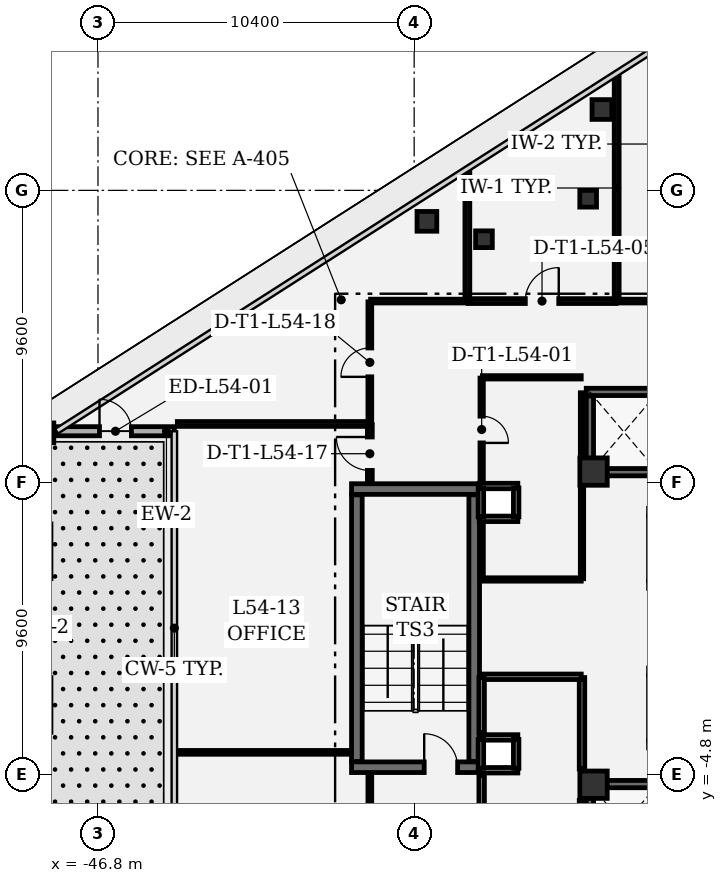
"""IFC4 building model, lengths in metres.
Left out: names, types, materials, properties, quantities, classifications, styles, units other than length and angle.
Written with IfcOpenShell. Run it as: python <this file> out.ifc"""

import sys

from ifc_helpers import new_model, si_unit, direction, frame, frame_2d, origin, origin_2d, place, context, subcontext, project, spatial, rectangle, extrude, element, fill, save


model = new_model("IFC4")
c1 = context("Model", 3, precision=1e-05, world=origin(), true_north=direction((0.0, 1.0)))
c2 = subcontext(c1, "Body", "Model", "MODEL_VIEW")
j1 = project(units=[si_unit("LENGTHUNIT", "METRE"), si_unit("PLANEANGLEUNIT", "RADIAN")], contexts=[c1])
p1 = place(None, origin())
s1 = spatial("IfcSite", under=j1, at=p1, CompositionType="ELEMENT")
p2 = place(p1, origin())
s2 = spatial("IfcBuilding", under=s1, at=p2, CompositionType="ELEMENT")
p3 = place(p2, frame((0.0, 0.0, 233.4)))
s3 = spatial("IfcBuildingStorey", under=s2, at=p3, CompositionType="ELEMENT", Elevation=233.4)
for number, where, z_axis, x_axis in (
    (1, (-30.5, 5.15, 0.0), (0.0, 0.0, 1.0), (1.0, 0.0, 0.0)),
    (2, (-30.5, -5.15, 0.0), (0.0, 0.0, 1.0), (1.0, 0.0, 0.0)),
):
    element("IfcColumn", number, at=place(p3, frame(where, z_axis=z_axis, x_axis=x_axis)), inside=s3, PredefinedType="COLUMN", context=c2, shape_type="SweptSolid", body=[
        extrude(rectangle(XDim=0.9, YDim=0.9, at=origin_2d()), origin(), (0.0, 0.0, 1.0), 4.05),
    ])
for number, where, z_axis, x_axis in (
    (3, (-48.578, 6.425, 0.0), (0.0, 0.0, 1.0), (1.0, 0.0, 0.0)),
    (4, (-35.981, 13.381, 0.0), (0.0, 0.0, 1.0), (1.0, 0.0, 0.0)),
    (5, (-30.225, 17.06, 0.0), (0.0, 0.0, 1.0), (1.0, 0.0, 0.0)),
):
    element("IfcColumn", number, at=place(p3, frame(where, z_axis=z_axis, x_axis=x_axis)), inside=s3, PredefinedType="COLUMN", context=c2, shape_type="SweptSolid", body=[
        extrude(rectangle(XDim=0.65, YDim=0.65, at=origin_2d()), origin(), (0.0, 0.0, 1.0), 4.05),
    ])
for number, where, z_axis, x_axis in (
    (6, (-34.104, 12.792, 0.0), (0.0, 0.0, 1.0), (1.0, 0.0, 0.0)),
    (7, (-30.677, 14.124, 0.0), (0.0, 0.0, 1.0), (1.0, 0.0, 0.0)),
):
    element("IfcColumn", number, at=place(p3, frame(where, z_axis=z_axis, x_axis=x_axis)), inside=s3, PredefinedType="COLUMN", context=c2, shape_type="SweptSolid", body=[
        extrude(rectangle(XDim=0.55, YDim=0.55, at=origin_2d()), origin(), (0.0, 0.0, 1.0), 4.05),
    ])
p4 = place(p3, frame((-48.162, 6.477, 0.0), z_axis=(0.0, 0.0, 1.0), x_axis=(1.0, 0.0, 0.0)))
e8 = element("IfcWall", 8, at=p4, inside=s3, PredefinedType="SOLIDWALL", context=c2, shape_type="SweptSolid", body=[
    extrude(rectangle(XDim=3.874, YDim=0.3, at=frame_2d((1.937, 0.0))), origin(), (0.0, 0.0, 1.0), 3.78),
])
p5 = place(p4, frame((1.412, 0.0, 0.0)))
e9 = element("IfcOpeningElement", 9, at=p5, cuts=e8, PredefinedType="OPENING", context=c2, shape_type="SweptSolid", body=[
    extrude(rectangle(XDim=1.05, YDim=2.2, at=frame_2d((0.525, 1.1))), frame((0.0, 0.16, 0.0), z_axis=(0.0, -1.0, 0.0), x_axis=(1.0, 0.0, 0.0)), (0.0, 0.0, 1.0), 0.32),
])
p6 = place(p3, frame((-38.46, -4.575, 0.0), z_axis=(0.0, 0.0, 1.0), x_axis=(1.0, 0.0, 0.0)))
e10 = element("IfcWall", 10, at=p6, inside=s3, PredefinedType="SHEAR", context=c2, shape_type="SweptSolid", body=[
    extrude(rectangle(XDim=4.21, YDim=0.35, at=frame_2d((2.105, 0.0))), origin(), (0.0, 0.0, 1.0), 3.78),
])
p7 = place(p6, frame((2.39, 0.0, 0.0)))
e11 = element("IfcOpeningElement", 11, at=p7, cuts=e10, PredefinedType="OPENING", context=c2, shape_type="SweptSolid", body=[
    extrude(rectangle(XDim=1.1, YDim=2.2, at=frame_2d((0.55, 1.1))), frame((0.0, 0.185, 0.0), z_axis=(0.0, -1.0, 0.0), x_axis=(1.0, 0.0, 0.0)), (0.0, 0.0, 1.0), 0.37),
])
p8 = place(p3, frame((-34.25, 4.575, 0.0), z_axis=(0.0, 0.0, 1.0), x_axis=(-1.0, 0.0, 0.0)))
e12 = element("IfcWall", 12, at=p8, inside=s3, PredefinedType="SHEAR", context=c2, shape_type="SweptSolid", body=[
    extrude(rectangle(XDim=4.21, YDim=0.35, at=frame_2d((2.105, 0.0))), origin(), (0.0, 0.0, 1.0), 3.78),
])
for number, where, z_axis, x_axis in (
    (13, (-34.425, -4.385, 0.0), (0.0, 0.0, 1.0), (0.0, 1.0, 0.0)),
    (14, (-38.285, 4.385, 0.0), (0.0, 0.0, 1.0), (0.0, -1.0, 0.0)),
):
    element("IfcWall", number, at=place(p3, frame(where, z_axis=z_axis, x_axis=x_axis)), inside=s3, PredefinedType="SHEAR", context=c2, shape_type="SweptSolid", body=[
        extrude(rectangle(XDim=8.77, YDim=0.35, at=frame_2d((4.385, 0.0))), origin(), (0.0, 0.0, 1.0), 3.78),
    ])
for number, where, z_axis, x_axis in (
    (15, (-28.26, 5.13, 0.0), (0.0, 0.0, 1.0), (-1.0, 0.0, 0.0)),
    (16, (-30.74, 7.77, 0.0), (0.0, 0.0, 1.0), (1.0, 0.0, 0.0)),
):
    element("IfcWall", number, at=place(p3, frame(where, z_axis=z_axis, x_axis=x_axis)), inside=s3, PredefinedType="SHEAR", context=c2, shape_type="SweptSolid", body=[
        extrude(rectangle(XDim=2.48, YDim=0.24, at=frame_2d((1.24, 0.0))), origin(), (0.0, 0.0, 1.0), 3.78),
    ])
p9 = place(p3, frame((-30.62, 5.262, 0.0), z_axis=(0.0, 0.0, 1.0), x_axis=(0.0, 1.0, 0.0)))
e17 = element("IfcWall", 17, at=p9, inside=s3, PredefinedType="SHEAR", context=c2, shape_type="SweptSolid", body=[
    extrude(rectangle(XDim=2.376, YDim=0.24, at=frame_2d((1.188, 0.0))), origin(), (0.0, 0.0, 1.0), 3.78),
])
p10 = place(p3, frame((-30.74, -5.13, 0.0), z_axis=(0.0, 0.0, 1.0), x_axis=(1.0, 0.0, 0.0)))
e18 = element("IfcWall", 18, at=p10, inside=s3, PredefinedType="SHEAR", context=c2, shape_type="SweptSolid", body=[
    extrude(rectangle(XDim=2.48, YDim=0.24, at=frame_2d((1.24, 0.0))), origin(), (0.0, 0.0, 1.0), 3.78),
])
p11 = place(p3, frame((-30.62, -7.638, 0.0), z_axis=(0.0, 0.0, 1.0), x_axis=(0.0, 1.0, 0.0)))
e19 = element("IfcWall", 19, at=p11, inside=s3, PredefinedType="SHEAR", context=c2, shape_type="SweptSolid", body=[
    extrude(rectangle(XDim=2.376, YDim=0.24, at=frame_2d((1.188, 0.0))), origin(), (0.0, 0.0, 1.0), 3.78),
])
for number, where, z_axis, x_axis in (
    (20, (-32.99, 3.595, 0.0), (0.0, 0.0, 1.0), (-1.0, 0.0, 0.0)),
    (21, (-34.26, 4.675, 0.0), (0.0, 0.0, 1.0), (1.0, 0.0, 0.0)),
):
    element("IfcWall", number, at=place(p3, frame(where, z_axis=z_axis, x_axis=x_axis)), inside=s3, PredefinedType="PARTITIONING", context=c2, shape_type="SweptSolid", body=[
        extrude(rectangle(XDim=1.27, YDim=0.18, at=frame_2d((0.635, 0.0))), origin(), (0.0, 0.0, 1.0), 3.78),
    ])
for number, where, z_axis, x_axis in (
    (22, (-34.205, 3.66, 0.0), (0.0, 0.0, 1.0), (0.0, 1.0, 0.0)),
    (23, (-33.045, 4.61, 0.0), (0.0, 0.0, 1.0), (0.0, -1.0, 0.0)),
):
    element("IfcWall", number, at=place(p3, frame(where, z_axis=z_axis, x_axis=x_axis)), inside=s3, PredefinedType="PARTITIONING", context=c2, shape_type="SweptSolid", body=[
        extrude(rectangle(XDim=0.95, YDim=0.18, at=frame_2d((0.475, 0.0))), origin(), (0.0, 0.0, 1.0), 3.78),
    ])
for number, where, z_axis, x_axis in (
    (24, (-32.99, -4.675, 0.0), (0.0, 0.0, 1.0), (-1.0, 0.0, 0.0)),
    (25, (-34.26, -3.595, 0.0), (0.0, 0.0, 1.0), (1.0, 0.0, 0.0)),
):
    element("IfcWall", number, at=place(p3, frame(where, z_axis=z_axis, x_axis=x_axis)), inside=s3, PredefinedType="PARTITIONING", context=c2, shape_type="SweptSolid", body=[
        extrude(rectangle(XDim=1.27, YDim=0.18, at=frame_2d((0.635, 0.0))), origin(), (0.0, 0.0, 1.0), 3.78),
    ])
for number, where, z_axis, x_axis in (
    (26, (-34.205, -4.61, 0.0), (0.0, 0.0, 1.0), (0.0, 1.0, 0.0)),
    (27, (-33.045, -3.66, 0.0), (0.0, 0.0, 1.0), (0.0, -1.0, 0.0)),
):
    element("IfcWall", number, at=place(p3, frame(where, z_axis=z_axis, x_axis=x_axis)), inside=s3, PredefinedType="PARTITIONING", context=c2, shape_type="SweptSolid", body=[
        extrude(rectangle(XDim=0.95, YDim=0.18, at=frame_2d((0.475, 0.0))), origin(), (0.0, 0.0, 1.0), 3.78),
    ])
p12 = place(p3, frame((-34.155, 1.6, 0.0), z_axis=(0.0, 0.0, 1.0), x_axis=(1.0, 0.0, 0.0)))
e28 = element("IfcWall", 28, at=p12, inside=s3, PredefinedType="PARTITIONING", context=c2, shape_type="SweptSolid", body=[
    extrude(rectangle(XDim=3.25, YDim=0.11, at=frame_2d((1.625, 0.0))), origin(), (0.0, 0.0, 1.0), 3.78),
])
p13 = place(p3, frame((-30.88, 1.625, 0.0), z_axis=(0.0, 0.0, 1.0), x_axis=(0.0, 1.0, 0.0)))
e29 = element("IfcWall", 29, at=p13, inside=s3, PredefinedType="PARTITIONING", context=c2, shape_type="SweptSolid", body=[
    extrude(rectangle(XDim=3.01, YDim=0.11, at=frame_2d((1.505, 0.0))), origin(), (0.0, 0.0, 1.0), 3.78),
])
p14 = place(p3, frame((-30.88, 5.665, 0.0), z_axis=(0.0, 0.0, 1.0), x_axis=(0.0, 1.0, 0.0)))
e30 = element("IfcWall", 30, at=p14, inside=s3, PredefinedType="PARTITIONING", context=c2, shape_type="SweptSolid", body=[
    extrude(rectangle(XDim=2.078, YDim=0.11, at=frame_2d((1.039, 0.0))), origin(), (0.0, 0.0, 1.0), 3.78),
])
p15 = place(p3, frame((-30.905, 8.25, 0.0), z_axis=(0.0, 0.0, 1.0), x_axis=(-1.0, 0.0, 0.0)))
e31 = element("IfcWall", 31, at=p15, inside=s3, PredefinedType="PARTITIONING", context=c2, shape_type="SweptSolid", body=[
    extrude(rectangle(XDim=3.25, YDim=0.11, at=frame_2d((1.625, 0.0))), origin(), (0.0, 0.0, 1.0), 3.78),
])
p16 = place(p3, frame((-34.18, 8.225, 0.0), z_axis=(0.0, 0.0, 1.0), x_axis=(0.0, -1.0, 0.0)))
e32 = element("IfcWall", 32, at=p16, inside=s3, PredefinedType="PARTITIONING", context=c2, shape_type="SweptSolid", body=[
    extrude(rectangle(XDim=3.385, YDim=0.11, at=frame_2d((1.692, 0.0))), origin(), (0.0, 0.0, 1.0), 3.78),
])
p17 = place(p16, frame((1.252, 0.0, 0.0)))
e33 = element("IfcOpeningElement", 33, at=p17, cuts=e32, PredefinedType="OPENING", context=c2, shape_type="SweptSolid", body=[
    extrude(rectangle(XDim=0.88, YDim=2.1, at=frame_2d((0.44, 1.05))), frame((0.0, 0.065, 0.0), z_axis=(0.0, -1.0, 0.0), x_axis=(1.0, 0.0, 0.0)), (0.0, 0.0, 1.0), 0.13),
])
p18 = place(p3, frame((-34.18, 3.43, 0.0), z_axis=(0.0, 0.0, 1.0), x_axis=(0.0, -1.0, 0.0)))
e34 = element("IfcWall", 34, at=p18, inside=s3, PredefinedType="PARTITIONING", context=c2, shape_type="SweptSolid", body=[
    extrude(rectangle(XDim=1.805, YDim=0.11, at=frame_2d((0.902, 0.0))), origin(), (0.0, 0.0, 1.0), 3.78),
])
p19 = place(p3, frame((-30.88, -7.743, 0.0), z_axis=(0.0, 0.0, 1.0), x_axis=(0.0, 1.0, 0.0)))
e35 = element("IfcWall", 35, at=p19, inside=s3, PredefinedType="PARTITIONING", context=c2, shape_type="SweptSolid", body=[
    extrude(rectangle(XDim=2.078, YDim=0.18, at=frame_2d((1.039, 0.0))), origin(), (0.0, 0.0, 1.0), 3.78),
])
p20 = place(p3, frame((-30.88, -4.635, 0.0), z_axis=(0.0, 0.0, 1.0), x_axis=(0.0, 1.0, 0.0)))
e36 = element("IfcWall", 36, at=p20, inside=s3, PredefinedType="PARTITIONING", context=c2, shape_type="SweptSolid", body=[
    extrude(rectangle(XDim=3.01, YDim=0.18, at=frame_2d((1.505, 0.0))), origin(), (0.0, 0.0, 1.0), 3.78),
])
p21 = place(p3, frame((-30.905, -1.6, 0.0), z_axis=(0.0, 0.0, 1.0), x_axis=(-1.0, 0.0, 0.0)))
e37 = element("IfcWall", 37, at=p21, inside=s3, PredefinedType="PARTITIONING", context=c2, shape_type="SweptSolid", body=[
    extrude(rectangle(XDim=3.25, YDim=0.18, at=frame_2d((1.625, 0.0))), origin(), (0.0, 0.0, 1.0), 3.78),
])
p22 = place(p3, frame((-34.18, -1.625, 0.0), z_axis=(0.0, 0.0, 1.0), x_axis=(0.0, -1.0, 0.0)))
e38 = element("IfcWall", 38, at=p22, inside=s3, PredefinedType="PARTITIONING", context=c2, shape_type="SweptSolid", body=[
    extrude(rectangle(XDim=1.805, YDim=0.18, at=frame_2d((0.902, 0.0))), origin(), (0.0, 0.0, 1.0), 3.78),
])
p23 = place(p3, frame((-34.18, -4.84, 0.0), z_axis=(0.0, 0.0, 1.0), x_axis=(0.0, -1.0, 0.0)))
e39 = element("IfcWall", 39, at=p23, inside=s3, PredefinedType="PARTITIONING", context=c2, shape_type="SweptSolid", body=[
    extrude(rectangle(XDim=3.485, YDim=0.18, at=frame_2d((1.743, 0.0))), origin(), (0.0, 0.0, 1.0), 3.78),
])
p24 = place(p23, frame((1.302, 0.0, 0.0)))
e40 = element("IfcOpeningElement", 40, at=p24, cuts=e39, PredefinedType="OPENING", context=c2, shape_type="SweptSolid", body=[
    extrude(rectangle(XDim=0.88, YDim=2.1, at=frame_2d((0.44, 1.05))), frame((0.0, 0.1, 0.0), z_axis=(0.0, -1.0, 0.0), x_axis=(1.0, 0.0, 0.0)), (0.0, 0.0, 1.0), 0.2),
])
p25 = place(p3, frame((-34.625, 10.758, 0.0), z_axis=(0.0, 0.0, 1.0), x_axis=(1.0, 0.0, 0.0)))
e41 = element("IfcWall", 41, at=p25, inside=s3, PredefinedType="PARTITIONING", context=c2, shape_type="SweptSolid", body=[
    extrude(rectangle(XDim=4.861, YDim=0.16, at=frame_2d((2.431, 0.0))), origin(), (0.0, 0.0, 1.0), 3.0),
])
p26 = place(p25, frame((1.881, 0.0, 0.0)))
e42 = element("IfcOpeningElement", 42, at=p26, cuts=e41, PredefinedType="OPENING", context=c2, shape_type="SweptSolid", body=[
    extrude(rectangle(XDim=1.1, YDim=2.15, at=frame_2d((0.55, 1.075))), frame((0.0, 0.09, 0.0), z_axis=(0.0, -1.0, 0.0), x_axis=(1.0, 0.0, 0.0)), (0.0, 0.0, 1.0), 0.18),
])
p27 = place(p3, frame((-29.739, 10.783, 0.0), z_axis=(0.0, 0.0, 1.0), x_axis=(0.0, 1.0, 0.0)))
e43 = element("IfcWall", 43, at=p27, inside=s3, PredefinedType="PARTITIONING", context=c2, shape_type="SweptSolid", body=[
    extrude(rectangle(XDim=7.389, YDim=0.16, at=frame_2d((3.694, 0.0))), origin(), (0.0, 0.0, 1.0), 3.78),
])
p28 = place(p3, frame((-34.65, 15.033, 0.0), z_axis=(0.0, 0.0, 1.0), x_axis=(0.0, -1.0, 0.0)))
e44 = element("IfcWall", 44, at=p28, inside=s3, PredefinedType="PARTITIONING", context=c2, shape_type="SweptSolid", body=[
    extrude(rectangle(XDim=4.25, YDim=0.16, at=frame_2d((2.125, 0.0))), origin(), (0.0, 0.0, 1.0), 3.78),
])
p29 = place(p3, frame((-29.706, 10.758, 0.0), z_axis=(0.0, 0.0, 1.0), x_axis=(1.0, 0.0, 0.0)))
e45 = element("IfcWall", 45, at=p29, inside=s3, PredefinedType="PARTITIONING", context=c2, shape_type="SweptSolid", body=[
    extrude(rectangle(XDim=4.468, YDim=0.125, at=frame_2d((2.234, 0.0))), origin(), (0.0, 0.0, 1.0), 3.78),
])
p30 = place(p29, frame((1.759, 0.0, 0.0)))
e46 = element("IfcOpeningElement", 46, at=p30, cuts=e45, PredefinedType="OPENING", context=c2, shape_type="SweptSolid", body=[
    extrude(rectangle(XDim=0.95, YDim=2.15, at=frame_2d((0.475, 1.075))), frame((0.0, 0.073, 0.0), z_axis=(0.0, -1.0, 0.0), x_axis=(1.0, 0.0, 0.0)), (0.0, 0.0, 1.0), 0.145),
])
p31 = place(p3, frame((-37.858, -10.933, 0.0), z_axis=(0.0, 0.0, 1.0), x_axis=(0.0, 1.0, 0.0)))
e47 = element("IfcWall", 47, at=p31, inside=s3, PredefinedType="PARTITIONING", context=c2, shape_type="SweptSolid", body=[
    extrude(rectangle(XDim=6.15, YDim=0.125, at=frame_2d((3.075, 0.0))), origin(), (0.0, 0.0, 1.0), 3.78),
])
p32 = place(p31, frame((2.6, 0.0, 0.0)))
e48 = element("IfcOpeningElement", 48, at=p32, cuts=e47, PredefinedType="OPENING", context=c2, shape_type="SweptSolid", body=[
    extrude(rectangle(XDim=0.95, YDim=2.15, at=frame_2d((0.475, 1.075))), frame((0.0, 0.073, 0.0), z_axis=(0.0, -1.0, 0.0), x_axis=(1.0, 0.0, 0.0)), (0.0, 0.0, 1.0), 0.145),
])
p33 = place(p3, frame((-38.493, -4.086, 0.0), z_axis=(0.0, 0.0, 1.0), x_axis=(-1.0, 0.0, 0.0)))
e49 = element("IfcWall", 49, at=p33, inside=s3, PredefinedType="PARTITIONING", context=c2, shape_type="SweptSolid", body=[
    extrude(rectangle(XDim=5.715, YDim=0.125, at=frame_2d((2.857, 0.0))), origin(), (0.0, 0.0, 1.0), 3.78),
])
p34 = place(p3, frame((-37.858, 4.783, 0.0), z_axis=(0.0, 0.0, 1.0), x_axis=(0.0, 1.0, 0.0)))
e50 = element("IfcWall", 50, at=p34, inside=s3, PredefinedType="PARTITIONING", context=c2, shape_type="SweptSolid", body=[
    extrude(rectangle(XDim=1.908, YDim=0.16, at=frame_2d((0.954, 0.0))), origin(), (0.0, 0.0, 1.0), 3.78),
])
p35 = place(p34, frame((0.404, 0.0, 0.0)))
e51 = element("IfcOpeningElement", 51, at=p35, cuts=e50, PredefinedType="OPENING", context=c2, shape_type="SweptSolid", body=[
    extrude(rectangle(XDim=1.1, YDim=2.15, at=frame_2d((0.55, 1.075))), frame((0.0, 0.09, 0.0), z_axis=(0.0, -1.0, 0.0), x_axis=(1.0, 0.0, 0.0)), (0.0, 0.0, 1.0), 0.18),
])
p36 = place(p3, frame((-37.883, 6.716, 0.0), z_axis=(0.0, 0.0, 1.0), x_axis=(-1.0, 0.0, 0.0)))
e52 = element("IfcWall", 52, at=p36, inside=s3, PredefinedType="PARTITIONING", context=c2, shape_type="SweptSolid", body=[
    extrude(rectangle(XDim=6.307, YDim=0.16, at=frame_2d((3.154, 0.0))), origin(), (0.0, 0.0, 1.0), 3.0),
])
p37 = place(p3, frame((-34.683, 10.758, 0.0), z_axis=(0.0, 0.0, 1.0), x_axis=(-1.0, 0.0, 0.0)))
e53 = element("IfcWall", 53, at=p37, inside=s3, PredefinedType="PARTITIONING", context=c2, shape_type="SweptSolid", body=[
    extrude(rectangle(XDim=3.15, YDim=0.125, at=frame_2d((1.575, 0.0))), origin(), (0.0, 0.0, 1.0), 3.0),
])
p38 = place(p3, frame((-37.858, 6.749, 0.0), z_axis=(0.0, 0.0, 1.0), x_axis=(0.0, 1.0, 0.0)))
e54 = element("IfcWall", 54, at=p38, inside=s3, PredefinedType="PARTITIONING", context=c2, shape_type="SweptSolid", body=[
    extrude(rectangle(XDim=3.984, YDim=0.125, at=frame_2d((1.992, 0.0))), origin(), (0.0, 0.0, 1.0), 3.78),
])
p39 = place(p38, frame((1.517, 0.0, 0.0)))
e55 = element("IfcOpeningElement", 55, at=p39, cuts=e54, PredefinedType="OPENING", context=c2, shape_type="SweptSolid", body=[
    extrude(rectangle(XDim=0.95, YDim=2.15, at=frame_2d((0.475, 1.075))), frame((0.0, 0.073, 0.0), z_axis=(0.0, -1.0, 0.0), x_axis=(1.0, 0.0, 0.0)), (0.0, 0.0, 1.0), 0.145),
])
p40 = place(p5, origin())
e56 = element("IfcDoor", 56, at=p40, inside=s3, OperationType="SINGLE_SWING_LEFT", PredefinedType="DOOR", context=c2, shape_type="SweptSolid", body=[
    extrude(rectangle(XDim=1.05, YDim=2.2, at=frame_2d((0.525, 1.1))), frame((0.0, 0.025, 0.0), z_axis=(0.0, -1.0, 0.0), x_axis=(1.0, 0.0, 0.0)), (0.0, 0.0, 1.0), 0.05),
])
fill(e9, e56)
p41 = place(p7, origin())
e57 = element("IfcDoor", 57, at=p41, inside=s3, OperationType="SINGLE_SWING_LEFT", PredefinedType="DOOR", context=c2, shape_type="SweptSolid", body=[
    extrude(rectangle(XDim=1.1, YDim=2.2, at=frame_2d((0.55, 1.1))), frame((0.0, 0.025, 0.0), z_axis=(0.0, -1.0, 0.0), x_axis=(1.0, 0.0, 0.0)), (0.0, 0.0, 1.0), 0.05),
])
fill(e11, e57)
p42 = place(p17, origin())
e58 = element("IfcDoor", 58, at=p42, inside=s3, OperationType="SINGLE_SWING_RIGHT", PredefinedType="DOOR", context=c2, shape_type="SweptSolid", body=[
    extrude(rectangle(XDim=0.88, YDim=2.1, at=frame_2d((0.44, 1.05))), frame((0.0, 0.025, 0.0), z_axis=(0.0, -1.0, 0.0), x_axis=(1.0, 0.0, 0.0)), (0.0, 0.0, 1.0), 0.05),
])
fill(e33, e58)
p43 = place(p26, origin())
e59 = element("IfcDoor", 59, at=p43, inside=s3, OperationType="SINGLE_SWING_RIGHT", PredefinedType="DOOR", context=c2, shape_type="SweptSolid", body=[
    extrude(rectangle(XDim=1.1, YDim=2.15, at=frame_2d((0.55, 1.075))), frame((0.0, 0.025, 0.0), z_axis=(0.0, -1.0, 0.0), x_axis=(1.0, 0.0, 0.0)), (0.0, 0.0, 1.0), 0.05),
])
fill(e42, e59)
p44 = place(p35, origin())
e60 = element("IfcDoor", 60, at=p44, inside=s3, OperationType="SINGLE_SWING_RIGHT", PredefinedType="DOOR", context=c2, shape_type="SweptSolid", body=[
    extrude(rectangle(XDim=1.1, YDim=2.15, at=frame_2d((0.55, 1.075))), frame((0.0, 0.025, 0.0), z_axis=(0.0, -1.0, 0.0), x_axis=(1.0, 0.0, 0.0)), (0.0, 0.0, 1.0), 0.05),
])
fill(e51, e60)
p45 = place(p39, origin())
e61 = element("IfcDoor", 61, at=p45, inside=s3, OperationType="SINGLE_SWING_LEFT", PredefinedType="DOOR", context=c2, shape_type="SweptSolid", body=[
    extrude(rectangle(XDim=0.95, YDim=2.15, at=frame_2d((0.475, 1.075))), frame((0.0, 0.025, 0.0), z_axis=(0.0, -1.0, 0.0), x_axis=(1.0, 0.0, 0.0)), (0.0, 0.0, 1.0), 0.05),
])
fill(e55, e61)
save(model, sys.argv[1])
